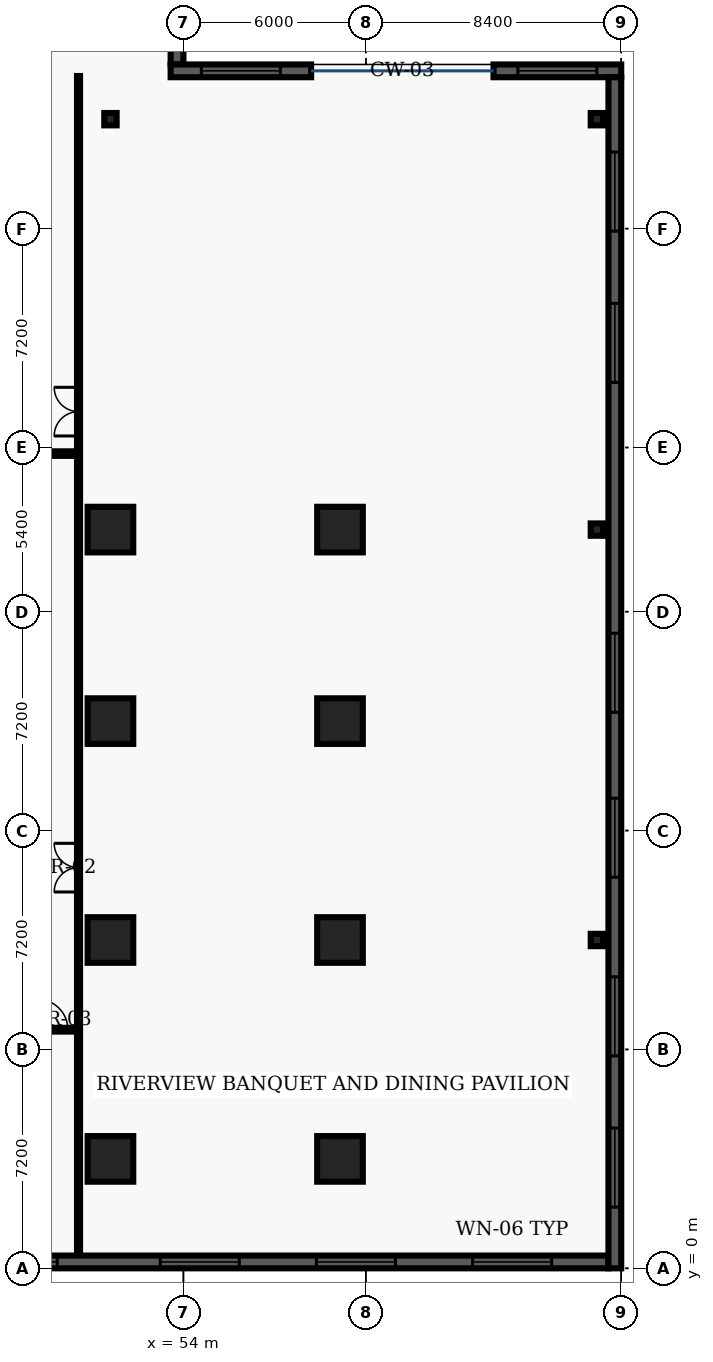
"""IFC4 building model, lengths in metres.
Left out: names, types, materials, properties, quantities, classifications, styles, units other than length and angle.
Written with IfcOpenShell. Run it as: python <this file> out.ifc"""

import sys

from ifc_helpers import new_model, entity, si_unit, converted_unit, direction, frame, origin_with_axes, origin_2d_with_axis, place, context, subcontext, project, spatial, polyline, rectangle, hollow_rectangle, outline, extrude, element, fill, save


model = new_model("IFC4")
c1 = context("Model", 3, precision=1e-05, world=origin_with_axes(), true_north=direction((0.0, 1.0)))
c2 = subcontext(c1, "Body", "Model", "MODEL_VIEW")
j1 = project(units=[si_unit("LENGTHUNIT", "METRE"), converted_unit("PLANEANGLEUNIT", "DEGREE", entity("IfcPlaneAngleMeasure", 0.017), si_unit("PLANEANGLEUNIT", "RADIAN"), dimensions=[0, 0, 0, 0, 0, 0, 0])], contexts=[c1])
p1 = place(None, origin_with_axes())
s1 = spatial("IfcSite", under=j1, at=p1, CompositionType="ELEMENT")
p2 = place(p1, origin_with_axes())
s2 = spatial("IfcBuilding", under=s1, at=p2, CompositionType="ELEMENT")
p3 = place(p2, frame((0.0, 0.0, 10.8), z_axis=(0.0, 0.0, 1.0), x_axis=(1.0, 0.0, 0.0)))
s3 = spatial("IfcBuildingStorey", under=s2, at=p3, CompositionType="ELEMENT", Elevation=10.8)
for number, where, z_axis, x_axis in (
    (1, (51.6, 3.6, 0.0), (0.0, 0.0, 1.0), (1.0, 0.0, 0.0)),
    (2, (51.6, 10.8, 0.0), (0.0, 0.0, 1.0), (1.0, 0.0, 0.0)),
    (3, (51.6, 18.0, 0.0), (0.0, 0.0, 1.0), (1.0, 0.0, 0.0)),
    (4, (51.6, 24.3, 0.0), (0.0, 0.0, 1.0), (1.0, 0.0, 0.0)),
    (5, (59.15, 3.6, 0.0), (0.0, 0.0, 1.0), (1.0, 0.0, 0.0)),
    (6, (59.15, 10.8, 0.0), (0.0, 0.0, 1.0), (1.0, 0.0, 0.0)),
    (7, (59.15, 18.0, 0.0), (0.0, 0.0, 1.0), (1.0, 0.0, 0.0)),
    (8, (59.15, 24.3, 0.0), (0.0, 0.0, 1.0), (1.0, 0.0, 0.0)),
):
    element("IfcColumn", number, at=place(p3, frame(where, z_axis=z_axis, x_axis=x_axis)), inside=s3, PredefinedType="COLUMN", context=c2, shape_type="SweptSolid", body=[
        extrude(rectangle(XDim=1.5, YDim=1.5, at=origin_2d_with_axis()), origin_with_axes(), (0.0, 0.0, 1.0), 4.5),
    ])
for number, where, z_axis, x_axis in (
    (9, (67.6, 10.8, 0.0), (0.0, 0.0, 1.0), (1.0, 0.0, 0.0)),
    (10, (67.6, 24.3, 0.0), (0.0, 0.0, 1.0), (1.0, 0.0, 0.0)),
    (11, (67.6, 37.8, 0.0), (0.0, 0.0, 1.0), (1.0, 0.0, 0.0)),
    (12, (51.6, 37.8, 0.0), (0.0, 0.0, 1.0), (1.0, 0.0, 0.0)),
):
    element("IfcColumn", number, at=place(p3, frame(where, z_axis=z_axis, x_axis=x_axis)), inside=s3, PredefinedType="COLUMN", context=c2, shape_type="SweptSolid", body=[
        extrude(hollow_rectangle(XDim=0.406, YDim=0.406, WallThickness=0.015, InnerFilletRadius=0.015, OuterFilletRadius=0.03, at=origin_2d_with_axis()), origin_with_axes(), (0.0, 0.0, 1.0), 4.5),
    ])
p4 = place(p3, frame((50.55, 0.38, 0.0), z_axis=(0.0, 0.0, 1.0), x_axis=(0.0, 1.0, 0.0)))
e13 = element("IfcWall", 13, at=p4, inside=s3, PredefinedType="PARTITIONING", context=c2, shape_type="SweptSolid", body=[
    extrude(outline(polyline([(0.0, -0.05), (38.84, -0.05), (38.84, 0.05), (0.0, 0.05), (0.0, -0.05)])), origin_with_axes(), (0.0, 0.0, 1.0), 3.2),
])
p5 = place(p4, frame((12.8, 0.0, 0.0), z_axis=(0.0, 0.0, 1.0), x_axis=(1.0, 0.0, 0.0)))
e14 = element("IfcOpeningElement", 14, at=p5, cuts=e13, PredefinedType="OPENING", context=c2, shape_type="SweptSolid", body=[
    extrude(rectangle(XDim=1.6, YDim=0.12, at=origin_2d_with_axis()), origin_with_axes(), (0.0, 0.0, 1.0), 2.2),
])
p6 = place(p4, frame((27.8, 0.0, 0.0), z_axis=(0.0, 0.0, 1.0), x_axis=(1.0, 0.0, 0.0)))
e15 = element("IfcOpeningElement", 15, at=p6, cuts=e13, PredefinedType="OPENING", context=c2, shape_type="SweptSolid", body=[
    extrude(rectangle(XDim=1.6, YDim=0.12, at=origin_2d_with_axis()), origin_with_axes(), (0.0, 0.0, 1.0), 2.2),
])
p7 = place(p3, frame((48.05, 7.85, 0.0), z_axis=(0.0, 0.0, 1.0), x_axis=(1.0, 0.0, 0.0)))
e16 = element("IfcWall", 16, at=p7, inside=s3, PredefinedType="PARTITIONING", context=c2, shape_type="SweptSolid", body=[
    extrude(outline(polyline([(0.0, -0.062), (2.5, -0.062), (2.5, 0.062), (0.0, 0.062), (0.0, -0.062)])), origin_with_axes(), (0.0, 0.0, 1.0), 3.2),
])
p8 = place(p7, frame((1.65, 0.0, 0.0), z_axis=(0.0, 0.0, 1.0), x_axis=(1.0, 0.0, 0.0)))
e17 = element("IfcOpeningElement", 17, at=p8, cuts=e16, PredefinedType="OPENING", context=c2, shape_type="SweptSolid", body=[
    extrude(rectangle(XDim=1.0, YDim=0.145, at=origin_2d_with_axis()), origin_with_axes(), (0.0, 0.0, 1.0), 2.15),
])
p9 = place(p3, frame((21.3, 26.8, 0.0), z_axis=(0.0, 0.0, 1.0), x_axis=(1.0, 0.0, 0.0)))
e18 = element("IfcWall", 18, at=p9, inside=s3, PredefinedType="PARTITIONING", context=c2, shape_type="SweptSolid", body=[
    extrude(outline(polyline([(0.0, -0.075), (29.25, -0.075), (29.25, 0.075), (0.0, 0.075), (0.0, -0.075)])), origin_with_axes(), (0.0, 0.0, 1.0), 3.2),
])
p10 = place(p3, frame((67.98, 0.21, 0.0), z_axis=(0.0, 0.0, 1.0), x_axis=(-1.0, 0.0, 0.0)))
e19 = element("IfcWall", 19, at=p10, inside=s3, PredefinedType="SOLIDWALL", context=c2, shape_type="SweptSolid", body=[
    extrude(outline(polyline([(0.0, -0.21), (67.98, -0.21), (67.98, 0.21), (0.0, 0.21), (0.0, -0.21)])), origin_with_axes(), (0.0, 0.0, 1.0), 4.26),
])
p11 = place(p10, frame((3.168, 0.0, 0.45), z_axis=(0.0, 0.0, 1.0), x_axis=(1.0, 0.0, 0.0)))
e20 = element("IfcOpeningElement", 20, at=p11, cuts=e19, PredefinedType="OPENING", context=c2, shape_type="SweptSolid", body=[
    extrude(rectangle(XDim=2.6, YDim=0.44, at=origin_2d_with_axis()), origin_with_axes(), (0.0, 0.0, 1.0), 2.8),
])
p12 = place(p10, frame((8.305, 0.0, 0.45), z_axis=(0.0, 0.0, 1.0), x_axis=(1.0, 0.0, 0.0)))
e21 = element("IfcOpeningElement", 21, at=p12, cuts=e19, PredefinedType="OPENING", context=c2, shape_type="SweptSolid", body=[
    extrude(rectangle(XDim=2.6, YDim=0.44, at=origin_2d_with_axis()), origin_with_axes(), (0.0, 0.0, 1.0), 2.8),
])
p13 = place(p10, frame((13.442, 0.0, 0.45), z_axis=(0.0, 0.0, 1.0), x_axis=(1.0, 0.0, 0.0)))
e22 = element("IfcOpeningElement", 22, at=p13, cuts=e19, PredefinedType="OPENING", context=c2, shape_type="SweptSolid", body=[
    extrude(rectangle(XDim=2.6, YDim=0.44, at=origin_2d_with_axis()), origin_with_axes(), (0.0, 0.0, 1.0), 2.8),
])
p14 = place(p10, frame((19.429, 0.0, 0.45), z_axis=(0.0, 0.0, 1.0), x_axis=(1.0, 0.0, 0.0)))
e23 = element("IfcOpeningElement", 23, at=p14, cuts=e19, PredefinedType="OPENING", context=c2, shape_type="SweptSolid", body=[
    extrude(rectangle(XDim=2.6, YDim=0.44, at=origin_2d_with_axis()), origin_with_axes(), (0.0, 0.0, 1.0), 2.8),
])
p15 = place(p10, frame((23.716, 0.0, 0.45), z_axis=(0.0, 0.0, 1.0), x_axis=(1.0, 0.0, 0.0)))
e24 = element("IfcOpeningElement", 24, at=p15, cuts=e19, PredefinedType="OPENING", context=c2, shape_type="SweptSolid", body=[
    extrude(rectangle(XDim=2.6, YDim=0.44, at=origin_2d_with_axis()), origin_with_axes(), (0.0, 0.0, 1.0), 2.8),
])
p16 = place(p10, frame((28.853, 0.0, 0.45), z_axis=(0.0, 0.0, 1.0), x_axis=(1.0, 0.0, 0.0)))
e25 = element("IfcOpeningElement", 25, at=p16, cuts=e19, PredefinedType="OPENING", context=c2, shape_type="SweptSolid", body=[
    extrude(rectangle(XDim=2.6, YDim=0.44, at=origin_2d_with_axis()), origin_with_axes(), (0.0, 0.0, 1.0), 2.8),
])
p17 = place(p10, frame((33.99, 0.0, 0.45), z_axis=(0.0, 0.0, 1.0), x_axis=(1.0, 0.0, 0.0)))
e26 = element("IfcOpeningElement", 26, at=p17, cuts=e19, PredefinedType="OPENING", context=c2, shape_type="SweptSolid", body=[
    extrude(rectangle(XDim=2.6, YDim=0.44, at=origin_2d_with_axis()), origin_with_axes(), (0.0, 0.0, 1.0), 2.8),
])
p18 = place(p10, frame((39.127, 0.0, 0.45), z_axis=(0.0, 0.0, 1.0), x_axis=(1.0, 0.0, 0.0)))
e27 = element("IfcOpeningElement", 27, at=p18, cuts=e19, PredefinedType="OPENING", context=c2, shape_type="SweptSolid", body=[
    extrude(rectangle(XDim=2.6, YDim=0.44, at=origin_2d_with_axis()), origin_with_axes(), (0.0, 0.0, 1.0), 2.8),
])
p19 = place(p10, frame((44.264, 0.0, 0.45), z_axis=(0.0, 0.0, 1.0), x_axis=(1.0, 0.0, 0.0)))
e28 = element("IfcOpeningElement", 28, at=p19, cuts=e19, PredefinedType="OPENING", context=c2, shape_type="SweptSolid", body=[
    extrude(rectangle(XDim=2.6, YDim=0.44, at=origin_2d_with_axis()), origin_with_axes(), (0.0, 0.0, 1.0), 2.8),
])
p20 = place(p10, frame((49.401, 0.0, 0.45), z_axis=(0.0, 0.0, 1.0), x_axis=(1.0, 0.0, 0.0)))
e29 = element("IfcOpeningElement", 29, at=p20, cuts=e19, PredefinedType="OPENING", context=c2, shape_type="SweptSolid", body=[
    extrude(rectangle(XDim=2.6, YDim=0.44, at=origin_2d_with_axis()), origin_with_axes(), (0.0, 0.0, 1.0), 2.8),
])
p21 = place(p10, frame((54.538, 0.0, 0.45), z_axis=(0.0, 0.0, 1.0), x_axis=(1.0, 0.0, 0.0)))
e30 = element("IfcOpeningElement", 30, at=p21, cuts=e19, PredefinedType="OPENING", context=c2, shape_type="SweptSolid", body=[
    extrude(rectangle(XDim=2.6, YDim=0.44, at=origin_2d_with_axis()), origin_with_axes(), (0.0, 0.0, 1.0), 2.8),
])
p22 = place(p10, frame((59.675, 0.0, 0.45), z_axis=(0.0, 0.0, 1.0), x_axis=(1.0, 0.0, 0.0)))
e31 = element("IfcOpeningElement", 31, at=p22, cuts=e19, PredefinedType="OPENING", context=c2, shape_type="SweptSolid", body=[
    extrude(rectangle(XDim=2.6, YDim=0.44, at=origin_2d_with_axis()), origin_with_axes(), (0.0, 0.0, 1.0), 2.8),
])
p23 = place(p10, frame((64.812, 0.0, 0.45), z_axis=(0.0, 0.0, 1.0), x_axis=(1.0, 0.0, 0.0)))
e32 = element("IfcOpeningElement", 32, at=p23, cuts=e19, PredefinedType="OPENING", context=c2, shape_type="SweptSolid", body=[
    extrude(rectangle(XDim=2.6, YDim=0.44, at=origin_2d_with_axis()), origin_with_axes(), (0.0, 0.0, 1.0), 2.8),
])
p24 = place(p3, frame((53.79, 41.55, 0.0), z_axis=(0.0, 0.0, 1.0), x_axis=(0.0, -1.0, 0.0)))
e33 = element("IfcWall", 33, at=p24, inside=s3, PredefinedType="SOLIDWALL", context=c2, shape_type="SweptSolid", body=[
    extrude(outline(polyline([(0.0, -0.21), (1.95, -0.21), (1.95, 0.21), (0.0, 0.21), (0.0, -0.21)])), origin_with_axes(), (0.0, 0.0, 1.0), 4.26),
])
p25 = place(p3, frame((53.58, 39.39, 0.0), z_axis=(0.0, 0.0, 1.0), x_axis=(1.0, 0.0, 0.0)))
e34 = element("IfcWall", 34, at=p25, inside=s3, PredefinedType="SOLIDWALL", context=c2, shape_type="SweptSolid", body=[
    extrude(outline(polyline([(0.0, -0.21), (4.62, -0.21), (4.62, 0.21), (0.0, 0.21), (0.0, -0.21)])), origin_with_axes(), (0.0, 0.0, 1.0), 4.26),
])
p26 = place(p25, frame((2.31, 0.0, 0.45), z_axis=(0.0, 0.0, 1.0), x_axis=(1.0, 0.0, 0.0)))
e35 = element("IfcOpeningElement", 35, at=p26, cuts=e34, PredefinedType="OPENING", context=c2, shape_type="SweptSolid", body=[
    extrude(rectangle(XDim=2.6, YDim=0.44, at=origin_2d_with_axis()), origin_with_axes(), (0.0, 0.0, 1.0), 2.8),
])
p27 = place(p3, frame((64.2, 39.39, 0.0), z_axis=(0.0, 0.0, 1.0), x_axis=(1.0, 0.0, 0.0)))
e36 = element("IfcWall", 36, at=p27, inside=s3, PredefinedType="SOLIDWALL", context=c2, shape_type="SweptSolid", body=[
    extrude(outline(polyline([(0.0, -0.21), (4.2, -0.21), (4.2, 0.21), (0.0, 0.21), (0.0, -0.21)])), origin_with_axes(), (0.0, 0.0, 1.0), 4.26),
])
p28 = place(p27, frame((2.1, 0.0, 0.45), z_axis=(0.0, 0.0, 1.0), x_axis=(1.0, 0.0, 0.0)))
e37 = element("IfcOpeningElement", 37, at=p28, cuts=e36, PredefinedType="OPENING", context=c2, shape_type="SweptSolid", body=[
    extrude(rectangle(XDim=2.6, YDim=0.44, at=origin_2d_with_axis()), origin_with_axes(), (0.0, 0.0, 1.0), 2.8),
])
p29 = place(p3, frame((68.19, 39.18, 0.0), z_axis=(0.0, 0.0, 1.0), x_axis=(0.0, -1.0, 0.0)))
e38 = element("IfcWall", 38, at=p29, inside=s3, PredefinedType="SOLIDWALL", context=c2, shape_type="SweptSolid", body=[
    extrude(outline(polyline([(0.0, -0.21), (39.18, -0.21), (39.18, 0.21), (0.0, 0.21), (0.0, -0.21)])), origin_with_axes(), (0.0, 0.0, 1.0), 4.26),
])
p30 = place(p29, frame((3.763, 0.0, 0.45), z_axis=(0.0, 0.0, 1.0), x_axis=(1.0, 0.0, 0.0)))
e39 = element("IfcOpeningElement", 39, at=p30, cuts=e38, PredefinedType="OPENING", context=c2, shape_type="SweptSolid", body=[
    extrude(rectangle(XDim=2.6, YDim=0.44, at=origin_2d_with_axis()), origin_with_axes(), (0.0, 0.0, 1.0), 2.8),
])
p31 = place(p29, frame((8.739, 0.0, 0.45), z_axis=(0.0, 0.0, 1.0), x_axis=(1.0, 0.0, 0.0)))
e40 = element("IfcOpeningElement", 40, at=p31, cuts=e38, PredefinedType="OPENING", context=c2, shape_type="SweptSolid", body=[
    extrude(rectangle(XDim=2.6, YDim=0.44, at=origin_2d_with_axis()), origin_with_axes(), (0.0, 0.0, 1.0), 2.8),
])
p32 = place(p29, frame((19.59, 0.0, 0.45), z_axis=(0.0, 0.0, 1.0), x_axis=(1.0, 0.0, 0.0)))
e41 = element("IfcOpeningElement", 41, at=p32, cuts=e38, PredefinedType="OPENING", context=c2, shape_type="SweptSolid", body=[
    extrude(rectangle(XDim=2.6, YDim=0.44, at=origin_2d_with_axis()), origin_with_axes(), (0.0, 0.0, 1.0), 2.8),
])
p33 = place(p29, frame((25.016, 0.0, 0.45), z_axis=(0.0, 0.0, 1.0), x_axis=(1.0, 0.0, 0.0)))
e42 = element("IfcOpeningElement", 42, at=p33, cuts=e38, PredefinedType="OPENING", context=c2, shape_type="SweptSolid", body=[
    extrude(rectangle(XDim=2.6, YDim=0.44, at=origin_2d_with_axis()), origin_with_axes(), (0.0, 0.0, 1.0), 2.8),
])
p34 = place(p29, frame((30.891, 0.0, 0.45), z_axis=(0.0, 0.0, 1.0), x_axis=(1.0, 0.0, 0.0)))
e43 = element("IfcOpeningElement", 43, at=p34, cuts=e38, PredefinedType="OPENING", context=c2, shape_type="SweptSolid", body=[
    extrude(rectangle(XDim=2.6, YDim=0.44, at=origin_2d_with_axis()), origin_with_axes(), (0.0, 0.0, 1.0), 2.8),
])
p35 = place(p29, frame((35.867, 0.0, 0.45), z_axis=(0.0, 0.0, 1.0), x_axis=(1.0, 0.0, 0.0)))
e44 = element("IfcOpeningElement", 44, at=p35, cuts=e38, PredefinedType="OPENING", context=c2, shape_type="SweptSolid", body=[
    extrude(rectangle(XDim=2.6, YDim=0.44, at=origin_2d_with_axis()), origin_with_axes(), (0.0, 0.0, 1.0), 2.8),
])
p36 = place(p7, frame((1.65, 0.0, 0.0), z_axis=(0.0, 0.0, 1.0), x_axis=(1.0, 0.0, 0.0)))
e45 = element("IfcDoor", 45, at=p36, inside=s3, OperationType="SINGLE_SWING_LEFT", PredefinedType="DOOR", context=c2, shape_type="SweptSolid", body=[
    extrude(rectangle(XDim=1.0, YDim=0.075, at=origin_2d_with_axis()), origin_with_axes(), (0.0, 0.0, 1.0), 2.15),
])
fill(e17, e45)
p37 = place(p4, frame((12.8, 0.0, 0.0), z_axis=(0.0, 0.0, 1.0), x_axis=(1.0, 0.0, 0.0)))
e46 = element("IfcDoor", 46, at=p37, inside=s3, OperationType="DOUBLE_DOOR_SINGLE_SWING", PredefinedType="DOOR", context=c2, shape_type="SweptSolid", body=[
    extrude(rectangle(XDim=1.6, YDim=0.06, at=origin_2d_with_axis()), origin_with_axes(), (0.0, 0.0, 1.0), 2.2),
])
fill(e14, e46)
p38 = place(p4, frame((27.8, 0.0, 0.0), z_axis=(0.0, 0.0, 1.0), x_axis=(1.0, 0.0, 0.0)))
e47 = element("IfcDoor", 47, at=p38, inside=s3, OperationType="DOUBLE_DOOR_SINGLE_SWING", PredefinedType="DOOR", context=c2, shape_type="SweptSolid", body=[
    extrude(rectangle(XDim=1.6, YDim=0.06, at=origin_2d_with_axis()), origin_with_axes(), (0.0, 0.0, 1.0), 2.2),
])
fill(e15, e47)
p39 = place(p10, frame((3.168, 0.0, 0.45), z_axis=(0.0, 0.0, 1.0), x_axis=(1.0, 0.0, 0.0)))
e48 = element("IfcWindow", 48, at=p39, inside=s3, PredefinedType="WINDOW", context=c2, shape_type="SweptSolid", body=[
    extrude(rectangle(XDim=2.6, YDim=0.09, at=origin_2d_with_axis()), origin_with_axes(), (0.0, 0.0, 1.0), 2.8),
])
fill(e20, e48)
p40 = place(p10, frame((8.305, 0.0, 0.45), z_axis=(0.0, 0.0, 1.0), x_axis=(1.0, 0.0, 0.0)))
e49 = element("IfcWindow", 49, at=p40, inside=s3, PredefinedType="WINDOW", context=c2, shape_type="SweptSolid", body=[
    extrude(rectangle(XDim=2.6, YDim=0.09, at=origin_2d_with_axis()), origin_with_axes(), (0.0, 0.0, 1.0), 2.8),
])
fill(e21, e49)
p41 = place(p10, frame((13.442, 0.0, 0.45), z_axis=(0.0, 0.0, 1.0), x_axis=(1.0, 0.0, 0.0)))
e50 = element("IfcWindow", 50, at=p41, inside=s3, PredefinedType="WINDOW", context=c2, shape_type="SweptSolid", body=[
    extrude(rectangle(XDim=2.6, YDim=0.09, at=origin_2d_with_axis()), origin_with_axes(), (0.0, 0.0, 1.0), 2.8),
])
fill(e22, e50)
p42 = place(p10, frame((19.429, 0.0, 0.45), z_axis=(0.0, 0.0, 1.0), x_axis=(1.0, 0.0, 0.0)))
e51 = element("IfcWindow", 51, at=p42, inside=s3, PredefinedType="WINDOW", context=c2, shape_type="SweptSolid", body=[
    extrude(rectangle(XDim=2.6, YDim=0.09, at=origin_2d_with_axis()), origin_with_axes(), (0.0, 0.0, 1.0), 2.8),
])
fill(e23, e51)
p43 = place(p25, frame((2.31, 0.0, 0.45), z_axis=(0.0, 0.0, 1.0), x_axis=(1.0, 0.0, 0.0)))
e52 = element("IfcWindow", 52, at=p43, inside=s3, PredefinedType="WINDOW", context=c2, shape_type="SweptSolid", body=[
    extrude(rectangle(XDim=2.6, YDim=0.09, at=origin_2d_with_axis()), origin_with_axes(), (0.0, 0.0, 1.0), 2.8),
])
fill(e35, e52)
p44 = place(p27, frame((2.1, 0.0, 0.45), z_axis=(0.0, 0.0, 1.0), x_axis=(1.0, 0.0, 0.0)))
e53 = element("IfcWindow", 53, at=p44, inside=s3, PredefinedType="WINDOW", context=c2, shape_type="SweptSolid", body=[
    extrude(rectangle(XDim=2.6, YDim=0.09, at=origin_2d_with_axis()), origin_with_axes(), (0.0, 0.0, 1.0), 2.8),
])
fill(e37, e53)
p45 = place(p29, frame((3.763, 0.0, 0.45), z_axis=(0.0, 0.0, 1.0), x_axis=(1.0, 0.0, 0.0)))
e54 = element("IfcWindow", 54, at=p45, inside=s3, PredefinedType="WINDOW", context=c2, shape_type="SweptSolid", body=[
    extrude(rectangle(XDim=2.6, YDim=0.09, at=origin_2d_with_axis()), origin_with_axes(), (0.0, 0.0, 1.0), 2.8),
])
fill(e39, e54)
p46 = place(p29, frame((8.739, 0.0, 0.45), z_axis=(0.0, 0.0, 1.0), x_axis=(1.0, 0.0, 0.0)))
e55 = element("IfcWindow", 55, at=p46, inside=s3, PredefinedType="WINDOW", context=c2, shape_type="SweptSolid", body=[
    extrude(rectangle(XDim=2.6, YDim=0.09, at=origin_2d_with_axis()), origin_with_axes(), (0.0, 0.0, 1.0), 2.8),
])
fill(e40, e55)
p47 = place(p29, frame((19.59, 0.0, 0.45), z_axis=(0.0, 0.0, 1.0), x_axis=(1.0, 0.0, 0.0)))
e56 = element("IfcWindow", 56, at=p47, inside=s3, PredefinedType="WINDOW", context=c2, shape_type="SweptSolid", body=[
    extrude(rectangle(XDim=2.6, YDim=0.09, at=origin_2d_with_axis()), origin_with_axes(), (0.0, 0.0, 1.0), 2.8),
])
fill(e41, e56)
p48 = place(p29, frame((25.016, 0.0, 0.45), z_axis=(0.0, 0.0, 1.0), x_axis=(1.0, 0.0, 0.0)))
e57 = element("IfcWindow", 57, at=p48, inside=s3, PredefinedType="WINDOW", context=c2, shape_type="SweptSolid", body=[
    extrude(rectangle(XDim=2.6, YDim=0.09, at=origin_2d_with_axis()), origin_with_axes(), (0.0, 0.0, 1.0), 2.8),
])
fill(e42, e57)
p49 = place(p29, frame((30.891, 0.0, 0.45), z_axis=(0.0, 0.0, 1.0), x_axis=(1.0, 0.0, 0.0)))
e58 = element("IfcWindow", 58, at=p49, inside=s3, PredefinedType="WINDOW", context=c2, shape_type="SweptSolid", body=[
    extrude(rectangle(XDim=2.6, YDim=0.09, at=origin_2d_with_axis()), origin_with_axes(), (0.0, 0.0, 1.0), 2.8),
])
fill(e43, e58)
p50 = place(p29, frame((35.867, 0.0, 0.45), z_axis=(0.0, 0.0, 1.0), x_axis=(1.0, 0.0, 0.0)))
e59 = element("IfcWindow", 59, at=p50, inside=s3, PredefinedType="WINDOW", context=c2, shape_type="SweptSolid", body=[
    extrude(rectangle(XDim=2.6, YDim=0.09, at=origin_2d_with_axis()), origin_with_axes(), (0.0, 0.0, 1.0), 2.8),
])
fill(e44, e59)
save(model, sys.argv[1])
